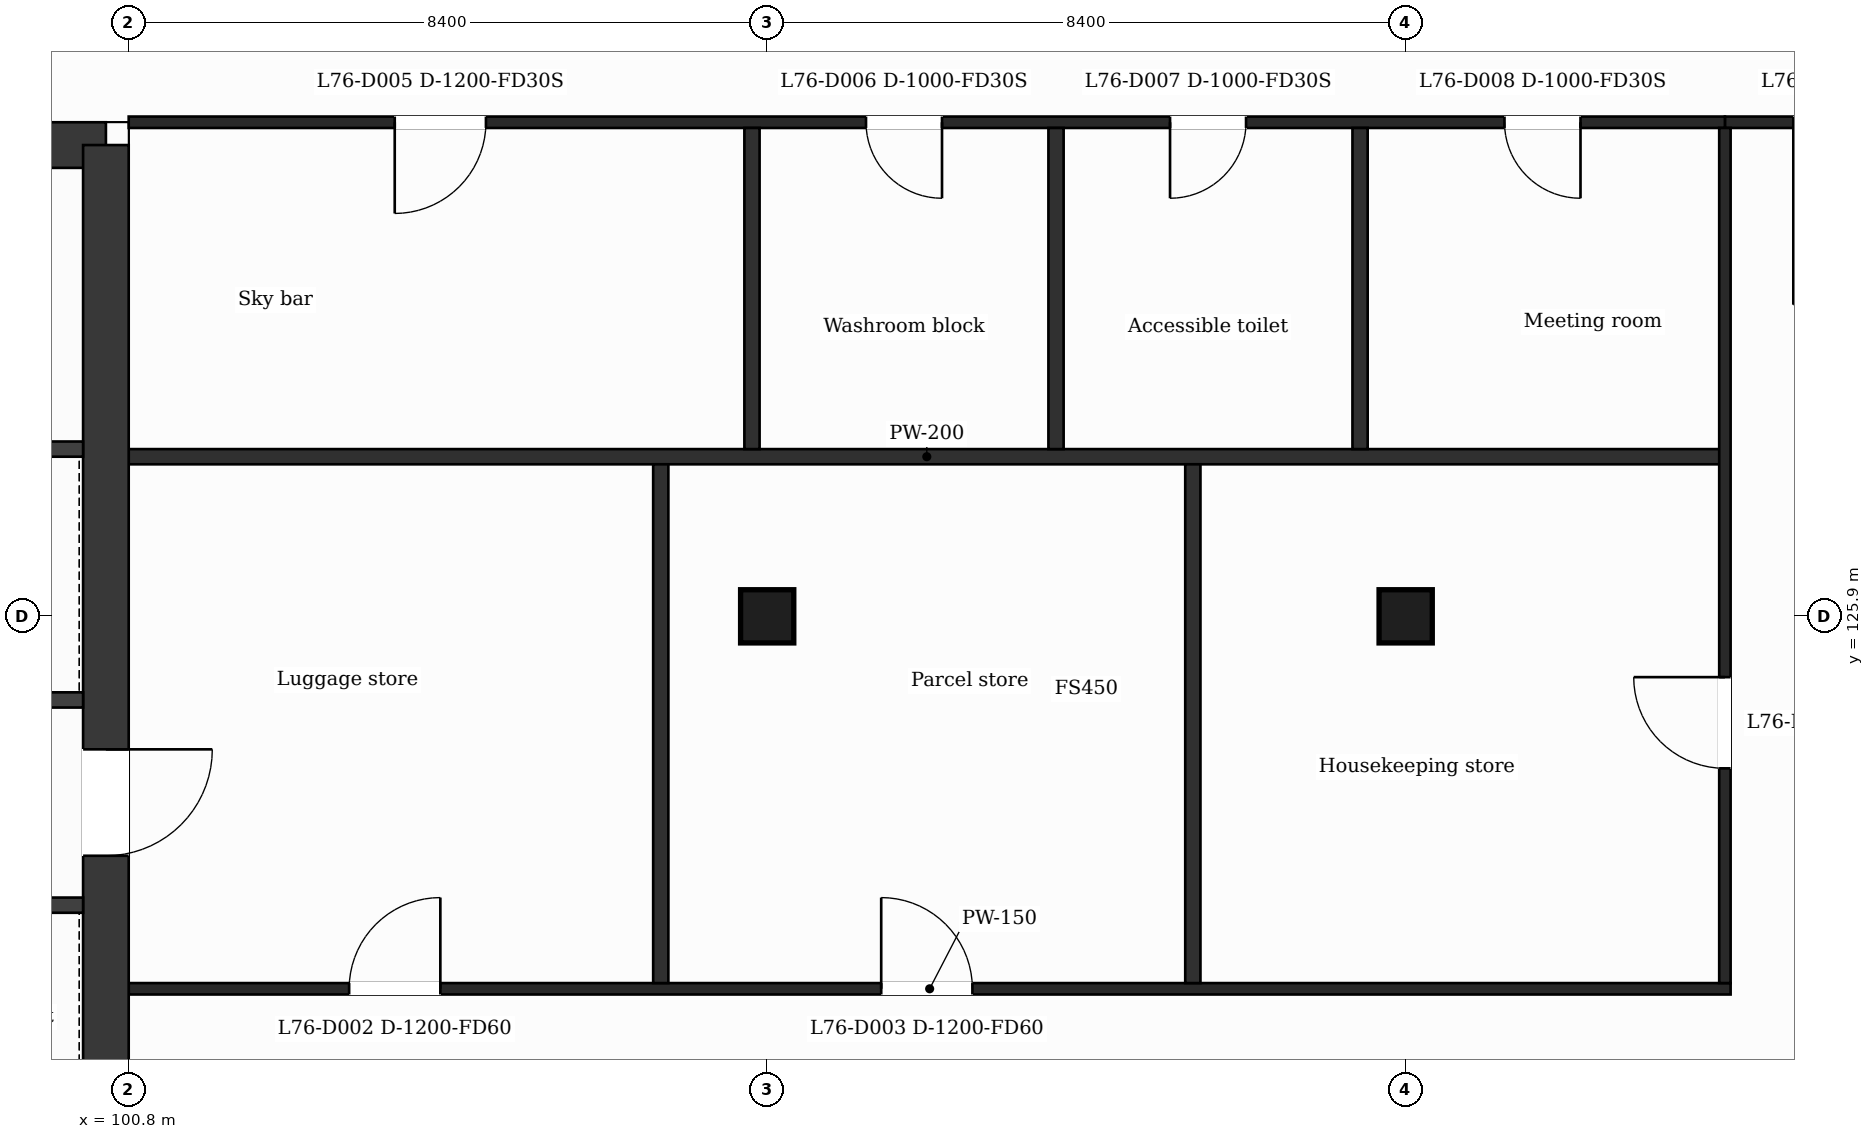
"""IFC4 building model, lengths in metres.
Left out: names, types, materials, properties, quantities, classifications, styles, units other than length and angle.
Written with IfcOpenShell. Run it as: python <this file> out.ifc"""

import sys

from ifc_helpers import new_model, si_unit, direction, frame, frame_2d, origin, origin_2d, place, context, subcontext, project, spatial, rectangle, extrude, element, fill, save


model = new_model("IFC4")
c1 = context("Model", 3, precision=1e-05, world=origin(), true_north=direction((0.0, 1.0)))
c2 = subcontext(c1, "Body", "Model", "MODEL_VIEW")
j1 = project(units=[si_unit("LENGTHUNIT", "METRE"), si_unit("PLANEANGLEUNIT", "RADIAN")], contexts=[c1])
p1 = place(None, origin())
s1 = spatial("IfcSite", under=j1, at=p1, CompositionType="ELEMENT")
p2 = place(p1, origin())
s2 = spatial("IfcBuilding", under=s1, at=p2, CompositionType="ELEMENT")
p3 = place(p2, frame((0.0, 0.0, 315.4)))
s3 = spatial("IfcBuildingStorey", under=s2, at=p3, CompositionType="ELEMENT", Elevation=315.4)
p4 = place(p3, frame((88.893, 132.1, 0.0), z_axis=(0.0, 0.0, 1.0), x_axis=(1.0, 0.0, 0.0)))
e1 = element("IfcWall", 1, at=p4, inside=s3, PredefinedType="SHEAR", context=c2, shape_type="SweptSolid", body=[
    extrude(rectangle(XDim=11.607, YDim=0.6, at=frame_2d((5.803, 0.0))), origin(), (0.0, 0.0, 1.0), 4.5),
])
p5 = place(p4, frame((7.021, 0.0, 0.0)))
e2 = element("IfcOpeningElement", 2, at=p5, cuts=e1, PredefinedType="OPENING", context=c2, shape_type="SweptSolid", body=[
    extrude(rectangle(XDim=1.2, YDim=2.1, at=frame_2d((0.6, 1.05))), frame((0.0, 0.31, 0.0), z_axis=(0.0, -1.0, 0.0), x_axis=(1.0, 0.0, 0.0)), (0.0, 0.0, 1.0), 0.62),
])
p6 = place(p3, frame((100.5, 132.1, 0.0), z_axis=(0.0, 0.0, 1.0), x_axis=(0.0, -1.0, 0.0)))
e3 = element("IfcWall", 3, at=p6, inside=s3, PredefinedType="SHEAR", context=c2, shape_type="SweptSolid", body=[
    extrude(rectangle(XDim=15.8, YDim=0.6, at=frame_2d((7.9, 0.0))), origin(), (0.0, 0.0, 1.0), 4.5),
])
p7 = place(p6, frame((7.95, 0.0, 0.0)))
e4 = element("IfcOpeningElement", 4, at=p7, cuts=e3, PredefinedType="OPENING", context=c2, shape_type="SweptSolid", body=[
    extrude(rectangle(XDim=1.4, YDim=2.1, at=frame_2d((0.7, 1.05))), frame((0.0, 0.31, 0.0), z_axis=(0.0, -1.0, 0.0), x_axis=(1.0, 0.0, 0.0)), (0.0, 0.0, 1.0), 0.62),
])
for number, where, z_axis, x_axis in (
    (5, (109.2, 125.9, 0.0), (0.0, 0.0, 1.0), (1.0, 0.0, 0.0)),
    (6, (117.6, 125.9, 0.0), (0.0, 0.0, 1.0), (1.0, 0.0, 0.0)),
):
    element("IfcColumn", number, at=place(p3, frame(where, z_axis=z_axis, x_axis=x_axis)), inside=s3, PredefinedType="COLUMN", context=c2, shape_type="SweptSolid", body=[
        extrude(rectangle(XDim=0.7, YDim=0.7, at=origin_2d()), origin(), (0.0, 0.0, 1.0), 4.5),
    ])
p8 = place(p3, frame((100.8, 121.0, 0.0), z_axis=(0.0, 0.0, 1.0), x_axis=(1.0, 0.0, 0.0)))
e7 = element("IfcWall", 7, at=p8, inside=s3, PredefinedType="PARTITIONING", context=c2, shape_type="SweptSolid", body=[
    extrude(rectangle(XDim=21.075, YDim=0.15, at=frame_2d((10.538, 0.0))), origin(), (0.0, 0.0, 1.0), 4.05),
])
p9 = place(p8, frame((2.9, 0.0, 0.0)))
e8 = element("IfcOpeningElement", 8, at=p9, cuts=e7, PredefinedType="OPENING", context=c2, shape_type="SweptSolid", body=[
    extrude(rectangle(XDim=1.2, YDim=2.1, at=frame_2d((0.6, 1.05))), frame((0.0, 0.085, 0.0), z_axis=(0.0, -1.0, 0.0), x_axis=(1.0, 0.0, 0.0)), (0.0, 0.0, 1.0), 0.17),
])
p10 = place(p8, frame((9.9, 0.0, 0.0)))
e9 = element("IfcOpeningElement", 9, at=p10, cuts=e7, PredefinedType="OPENING", context=c2, shape_type="SweptSolid", body=[
    extrude(rectangle(XDim=1.2, YDim=2.1, at=frame_2d((0.6, 1.05))), frame((0.0, 0.085, 0.0), z_axis=(0.0, -1.0, 0.0), x_axis=(1.0, 0.0, 0.0)), (0.0, 0.0, 1.0), 0.17),
])
p11 = place(p3, frame((95.227, 122.1, 0.0), z_axis=(0.0, 0.0, 1.0), x_axis=(1.0, 0.0, 0.0)))
e10 = element("IfcWall", 10, at=p11, inside=s3, PredefinedType="PARTITIONING", context=c2, shape_type="SweptSolid", body=[
    extrude(rectangle(XDim=4.973, YDim=0.2, at=frame_2d((2.486, 0.0))), origin(), (0.0, 0.0, 1.0), 4.05),
])
p12 = place(p11, frame((0.762, 0.0, 0.0)))
e11 = element("IfcOpeningElement", 11, at=p12, cuts=e10, PredefinedType="OPENING", context=c2, shape_type="SweptSolid", body=[
    extrude(rectangle(XDim=1.1, YDim=2.1, at=frame_2d((0.55, 1.05))), frame((0.0, 0.11, 0.0), z_axis=(0.0, -1.0, 0.0), x_axis=(1.0, 0.0, 0.0)), (0.0, 0.0, 1.0), 0.22),
])
p13 = place(p11, frame((3.111, 0.0, 0.0)))
e12 = element("IfcOpeningElement", 12, at=p13, cuts=e10, PredefinedType="OPENING", context=c2, shape_type="SweptSolid", body=[
    extrude(rectangle(XDim=1.1, YDim=2.1, at=frame_2d((0.55, 1.05))), frame((0.0, 0.11, 0.0), z_axis=(0.0, -1.0, 0.0), x_axis=(1.0, 0.0, 0.0)), (0.0, 0.0, 1.0), 0.22),
])
p14 = place(p3, frame((92.702, 124.8, 0.0), z_axis=(0.0, 0.0, 1.0), x_axis=(1.0, 0.0, 0.0)))
e13 = element("IfcWall", 13, at=p14, inside=s3, PredefinedType="PARTITIONING", context=c2, shape_type="SweptSolid", body=[
    extrude(rectangle(XDim=7.498, YDim=0.2, at=frame_2d((3.749, 0.0))), origin(), (0.0, 0.0, 1.0), 4.05),
])
p15 = place(p14, frame((0.87, 0.0, 0.0)))
e14 = element("IfcOpeningElement", 14, at=p15, cuts=e13, PredefinedType="OPENING", context=c2, shape_type="SweptSolid", body=[
    extrude(rectangle(XDim=1.1, YDim=2.1, at=frame_2d((0.55, 1.05))), frame((0.0, 0.11, 0.0), z_axis=(0.0, -1.0, 0.0), x_axis=(1.0, 0.0, 0.0)), (0.0, 0.0, 1.0), 0.22),
])
p16 = place(p14, frame((5.785, 0.0, 0.0)))
e15 = element("IfcOpeningElement", 15, at=p16, cuts=e13, PredefinedType="OPENING", context=c2, shape_type="SweptSolid", body=[
    extrude(rectangle(XDim=1.1, YDim=2.1, at=frame_2d((0.55, 1.05))), frame((0.0, 0.11, 0.0), z_axis=(0.0, -1.0, 0.0), x_axis=(1.0, 0.0, 0.0)), (0.0, 0.0, 1.0), 0.22),
])
p17 = place(p3, frame((100.8, 128.0, 0.0), z_axis=(0.0, 0.0, 1.0), x_axis=(1.0, 0.0, 0.0)))
e16 = element("IfcWall", 16, at=p17, inside=s3, PredefinedType="PARTITIONING", context=c2, shape_type="SweptSolid", body=[
    extrude(rectangle(XDim=21.0, YDim=0.2, at=frame_2d((10.5, 0.0))), origin(), (0.0, 0.0, 1.0), 4.05),
])
p18 = place(p3, frame((92.827, 128.1, 0.0), z_axis=(0.0, 0.0, 1.0), x_axis=(1.0, 0.0, 0.0)))
e17 = element("IfcWall", 17, at=p18, inside=s3, PredefinedType="PARTITIONING", context=c2, shape_type="SweptSolid", body=[
    extrude(rectangle(XDim=7.373, YDim=0.2, at=frame_2d((3.687, 0.0))), origin(), (0.0, 0.0, 1.0), 4.05),
])
p19 = place(p18, frame((3.202, 0.0, 0.0)))
e18 = element("IfcOpeningElement", 18, at=p19, cuts=e17, PredefinedType="OPENING", context=c2, shape_type="SweptSolid", body=[
    extrude(rectangle(XDim=1.1, YDim=2.1, at=frame_2d((0.55, 1.05))), frame((0.0, 0.11, 0.0), z_axis=(0.0, -1.0, 0.0), x_axis=(1.0, 0.0, 0.0)), (0.0, 0.0, 1.0), 0.22),
])
p20 = place(p3, frame((121.8, 132.4, 0.0), z_axis=(0.0, 0.0, 1.0), x_axis=(1.0, 0.0, 0.0)))
e19 = element("IfcWall", 19, at=p20, inside=s3, PredefinedType="PARTITIONING", context=c2, shape_type="SweptSolid", body=[
    extrude(rectangle(XDim=4.2, YDim=0.15, at=frame_2d((2.1, 0.0))), origin(), (0.0, 0.0, 1.0), 4.05),
])
p21 = place(p20, frame((0.9, 0.0, 0.0)))
e20 = element("IfcOpeningElement", 20, at=p21, cuts=e19, PredefinedType="OPENING", context=c2, shape_type="SweptSolid", body=[
    extrude(rectangle(XDim=2.4, YDim=2.1, at=frame_2d((1.2, 1.05))), frame((0.0, 0.085, 0.0), z_axis=(0.0, -1.0, 0.0), x_axis=(1.0, 0.0, 0.0)), (0.0, 0.0, 1.0), 0.17),
])
p22 = place(p3, frame((100.8, 132.4, 0.0), z_axis=(0.0, 0.0, 1.0), x_axis=(1.0, 0.0, 0.0)))
e21 = element("IfcWall", 21, at=p22, inside=s3, PredefinedType="PARTITIONING", context=c2, shape_type="SweptSolid", body=[
    extrude(rectangle(XDim=21.0, YDim=0.15, at=frame_2d((10.5, 0.0))), origin(), (0.0, 0.0, 1.0), 4.05),
])
p23 = place(p22, frame((3.5, 0.0, 0.0)))
e22 = element("IfcOpeningElement", 22, at=p23, cuts=e21, PredefinedType="OPENING", context=c2, shape_type="SweptSolid", body=[
    extrude(rectangle(XDim=1.2, YDim=2.1, at=frame_2d((0.6, 1.05))), frame((0.0, 0.085, 0.0), z_axis=(0.0, -1.0, 0.0), x_axis=(1.0, 0.0, 0.0)), (0.0, 0.0, 1.0), 0.17),
])
p24 = place(p22, frame((9.7, 0.0, 0.0)))
e23 = element("IfcOpeningElement", 23, at=p24, cuts=e21, PredefinedType="OPENING", context=c2, shape_type="SweptSolid", body=[
    extrude(rectangle(XDim=1.0, YDim=2.1, at=frame_2d((0.5, 1.05))), frame((0.0, 0.085, 0.0), z_axis=(0.0, -1.0, 0.0), x_axis=(1.0, 0.0, 0.0)), (0.0, 0.0, 1.0), 0.17),
])
p25 = place(p22, frame((13.7, 0.0, 0.0)))
e24 = element("IfcOpeningElement", 24, at=p25, cuts=e21, PredefinedType="OPENING", context=c2, shape_type="SweptSolid", body=[
    extrude(rectangle(XDim=1.0, YDim=2.1, at=frame_2d((0.5, 1.05))), frame((0.0, 0.085, 0.0), z_axis=(0.0, -1.0, 0.0), x_axis=(1.0, 0.0, 0.0)), (0.0, 0.0, 1.0), 0.17),
])
p26 = place(p22, frame((18.1, 0.0, 0.0)))
e25 = element("IfcOpeningElement", 25, at=p26, cuts=e21, PredefinedType="OPENING", context=c2, shape_type="SweptSolid", body=[
    extrude(rectangle(XDim=1.0, YDim=2.1, at=frame_2d((0.5, 1.05))), frame((0.0, 0.085, 0.0), z_axis=(0.0, -1.0, 0.0), x_axis=(1.0, 0.0, 0.0)), (0.0, 0.0, 1.0), 0.17),
])
p27 = place(p3, frame((107.8, 121.075, 0.0), z_axis=(0.0, 0.0, 1.0), x_axis=(0.0, 1.0, 0.0)))
e26 = element("IfcWall", 26, at=p27, inside=s3, PredefinedType="PARTITIONING", context=c2, shape_type="SweptSolid", body=[
    extrude(rectangle(XDim=6.825, YDim=0.2, at=frame_2d((3.413, 0.0))), origin(), (0.0, 0.0, 1.0), 4.05),
])
for number, where, z_axis, x_axis in (
    (27, (109.0, 128.1, 0.0), (0.0, 0.0, 1.0), (0.0, 1.0, 0.0)),
    (28, (113.0, 128.1, 0.0), (0.0, 0.0, 1.0), (0.0, 1.0, 0.0)),
):
    element("IfcWall", number, at=place(p3, frame(where, z_axis=z_axis, x_axis=x_axis)), inside=s3, PredefinedType="PARTITIONING", context=c2, shape_type="SweptSolid", body=[
        extrude(rectangle(XDim=4.225, YDim=0.2, at=frame_2d((2.112, 0.0))), origin(), (0.0, 0.0, 1.0), 4.05),
    ])
p28 = place(p3, frame((114.8, 121.075, 0.0), z_axis=(0.0, 0.0, 1.0), x_axis=(0.0, 1.0, 0.0)))
e29 = element("IfcWall", 29, at=p28, inside=s3, PredefinedType="PARTITIONING", context=c2, shape_type="SweptSolid", body=[
    extrude(rectangle(XDim=6.825, YDim=0.2, at=frame_2d((3.413, 0.0))), origin(), (0.0, 0.0, 1.0), 4.05),
])
p29 = place(p3, frame((117.0, 128.1, 0.0), z_axis=(0.0, 0.0, 1.0), x_axis=(0.0, 1.0, 0.0)))
e30 = element("IfcWall", 30, at=p29, inside=s3, PredefinedType="PARTITIONING", context=c2, shape_type="SweptSolid", body=[
    extrude(rectangle(XDim=4.225, YDim=0.2, at=frame_2d((2.112, 0.0))), origin(), (0.0, 0.0, 1.0), 4.05),
])
p30 = place(p3, frame((121.8, 121.075, 0.0), z_axis=(0.0, 0.0, 1.0), x_axis=(0.0, 1.0, 0.0)))
e31 = element("IfcWall", 31, at=p30, inside=s3, PredefinedType="PARTITIONING", context=c2, shape_type="SweptSolid", body=[
    extrude(rectangle(XDim=11.25, YDim=0.15, at=frame_2d((5.625, 0.0))), origin(), (0.0, 0.0, 1.0), 4.05),
])
p31 = place(p30, frame((2.825, 0.0, 0.0)))
e32 = element("IfcOpeningElement", 32, at=p31, cuts=e31, PredefinedType="OPENING", context=c2, shape_type="SweptSolid", body=[
    extrude(rectangle(XDim=1.2, YDim=2.1, at=frame_2d((0.6, 1.05))), frame((0.0, 0.085, 0.0), z_axis=(0.0, -1.0, 0.0), x_axis=(1.0, 0.0, 0.0)), (0.0, 0.0, 1.0), 0.17),
])
p32 = place(p21, origin())
e33 = element("IfcDoor", 33, at=p32, inside=s3, OperationType="SINGLE_SWING_LEFT", PredefinedType="DOOR", context=c2, shape_type="SweptSolid", body=[
    extrude(rectangle(XDim=2.4, YDim=2.1, at=frame_2d((1.2, 1.05))), frame((0.0, 0.025, 0.0), z_axis=(0.0, -1.0, 0.0), x_axis=(1.0, 0.0, 0.0)), (0.0, 0.0, 1.0), 0.05),
])
fill(e20, e33)
p33 = place(p9, origin())
e34 = element("IfcDoor", 34, at=p33, inside=s3, OperationType="SINGLE_SWING_RIGHT", PredefinedType="DOOR", context=c2, shape_type="SweptSolid", body=[
    extrude(rectangle(XDim=1.2, YDim=2.1, at=frame_2d((0.6, 1.05))), frame((0.0, 0.025, 0.0), z_axis=(0.0, -1.0, 0.0), x_axis=(1.0, 0.0, 0.0)), (0.0, 0.0, 1.0), 0.05),
])
fill(e8, e34)
p34 = place(p10, origin())
e35 = element("IfcDoor", 35, at=p34, inside=s3, OperationType="SINGLE_SWING_LEFT", PredefinedType="DOOR", context=c2, shape_type="SweptSolid", body=[
    extrude(rectangle(XDim=1.2, YDim=2.1, at=frame_2d((0.6, 1.05))), frame((0.0, 0.025, 0.0), z_axis=(0.0, -1.0, 0.0), x_axis=(1.0, 0.0, 0.0)), (0.0, 0.0, 1.0), 0.05),
])
fill(e9, e35)
p35 = place(p31, origin())
e36 = element("IfcDoor", 36, at=p35, inside=s3, OperationType="SINGLE_SWING_RIGHT", PredefinedType="DOOR", context=c2, shape_type="SweptSolid", body=[
    extrude(rectangle(XDim=1.2, YDim=2.1, at=frame_2d((0.6, 1.05))), frame((0.0, 0.025, 0.0), z_axis=(0.0, -1.0, 0.0), x_axis=(1.0, 0.0, 0.0)), (0.0, 0.0, 1.0), 0.05),
])
fill(e32, e36)
p36 = place(p23, origin())
e37 = element("IfcDoor", 37, at=p36, inside=s3, OperationType="SINGLE_SWING_LEFT", PredefinedType="DOOR", context=c2, shape_type="SweptSolid", body=[
    extrude(rectangle(XDim=1.2, YDim=2.1, at=frame_2d((0.6, 1.05))), frame((0.0, 0.025, 0.0), z_axis=(0.0, -1.0, 0.0), x_axis=(1.0, 0.0, 0.0)), (0.0, 0.0, 1.0), 0.05),
])
fill(e22, e37)
p37 = place(p24, origin())
e38 = element("IfcDoor", 38, at=p37, inside=s3, OperationType="SINGLE_SWING_RIGHT", PredefinedType="DOOR", context=c2, shape_type="SweptSolid", body=[
    extrude(rectangle(XDim=1.0, YDim=2.1, at=frame_2d((0.5, 1.05))), frame((0.0, 0.025, 0.0), z_axis=(0.0, -1.0, 0.0), x_axis=(1.0, 0.0, 0.0)), (0.0, 0.0, 1.0), 0.05),
])
fill(e23, e38)
p38 = place(p25, origin())
e39 = element("IfcDoor", 39, at=p38, inside=s3, OperationType="SINGLE_SWING_LEFT", PredefinedType="DOOR", context=c2, shape_type="SweptSolid", body=[
    extrude(rectangle(XDim=1.0, YDim=2.1, at=frame_2d((0.5, 1.05))), frame((0.0, 0.025, 0.0), z_axis=(0.0, -1.0, 0.0), x_axis=(1.0, 0.0, 0.0)), (0.0, 0.0, 1.0), 0.05),
])
fill(e24, e39)
p39 = place(p26, origin())
e40 = element("IfcDoor", 40, at=p39, inside=s3, OperationType="SINGLE_SWING_RIGHT", PredefinedType="DOOR", context=c2, shape_type="SweptSolid", body=[
    extrude(rectangle(XDim=1.0, YDim=2.1, at=frame_2d((0.5, 1.05))), frame((0.0, 0.025, 0.0), z_axis=(0.0, -1.0, 0.0), x_axis=(1.0, 0.0, 0.0)), (0.0, 0.0, 1.0), 0.05),
])
fill(e25, e40)
p40 = place(p7, origin())
e41 = element("IfcDoor", 41, at=p40, inside=s3, OperationType="SINGLE_SWING_LEFT", PredefinedType="DOOR", context=c2, shape_type="SweptSolid", body=[
    extrude(rectangle(XDim=1.4, YDim=2.1, at=frame_2d((0.7, 1.05))), frame((0.0, 0.025, 0.0), z_axis=(0.0, -1.0, 0.0), x_axis=(1.0, 0.0, 0.0)), (0.0, 0.0, 1.0), 0.05),
])
fill(e4, e41)
save(model, sys.argv[1])
